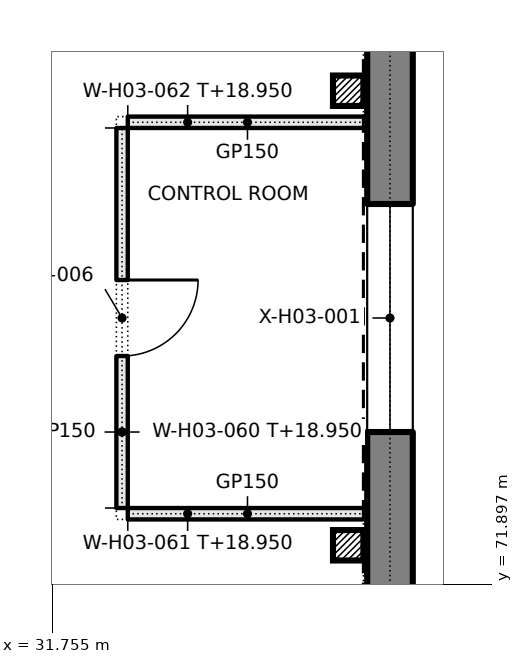
"""IFC4 building model, lengths in metres.
Left out: names, types, materials, properties, quantities, classifications, styles, units other than length and angle.
Written with IfcOpenShell. Run it as: python <this file> out.ifc"""

import sys

from ifc_helpers import new_model, si_unit, direction, frame, frame_2d, origin, origin_2d, place, context, subcontext, project, spatial, rectangle, extrude, element, fill, save


model = new_model("IFC4")
c1 = context("Model", 3, precision=1e-05, world=origin(), true_north=direction((0.0, 1.0)))
c2 = subcontext(c1, "Body", "Model", "MODEL_VIEW")
j1 = project(units=[si_unit("LENGTHUNIT", "METRE"), si_unit("PLANEANGLEUNIT", "RADIAN")], contexts=[c1])
p1 = place(None, origin())
s1 = spatial("IfcSite", under=j1, at=p1, CompositionType="ELEMENT")
p2 = place(p1, origin())
s2 = spatial("IfcBuilding", under=s1, at=p2, CompositionType="ELEMENT")
p3 = place(p2, frame((0.0, 0.0, 15.0)))
s3 = spatial("IfcBuildingStorey", under=s2, at=p3, CompositionType="ELEMENT", Elevation=15.0)
p4 = place(p3, frame((36.2, 60.7, 0.0), z_axis=(0.0, 0.0, 1.0), x_axis=(0.0, 1.0, 0.0)))
e1 = element("IfcWall", 1, at=p4, inside=s3, PredefinedType="SOLIDWALL", context=c2, shape_type="SweptSolid", body=[
    extrude(rectangle(XDim=29.4, YDim=0.6, at=frame_2d((14.7, 0.0))), origin(), (0.0, 0.0, 1.0), 4.2),
])
p5 = place(p4, frame((13.2, 0.0, 1.0)))
e2 = element("IfcOpeningElement", 2, at=p5, cuts=e1, PredefinedType="OPENING", context=c2, shape_type="SweptSolid", body=[
    extrude(rectangle(XDim=3.0, YDim=1.2, at=frame_2d((1.5, 0.6))), frame((0.0, 0.31, 0.0), z_axis=(0.0, -1.0, 0.0), x_axis=(1.0, 0.0, 0.0)), (0.0, 0.0, 1.0), 0.62),
])
for number, where, z_axis, x_axis in (
    (3, (35.65, 72.41, 0.0), (0.0, 0.0, 1.0), (1.0, 0.0, 0.0)),
    (4, (35.65, 78.39, 0.0), (0.0, 0.0, 1.0), (1.0, 0.0, 0.0)),
):
    element("IfcColumn", number, at=place(p3, frame(where, z_axis=z_axis, x_axis=x_axis)), inside=s3, PredefinedType="COLUMN", context=c2, shape_type="SweptSolid", body=[
        extrude(rectangle(XDim=0.4, YDim=0.4, at=origin_2d()), origin(), (0.0, 0.0, 1.0), 4.2),
    ])
p6 = place(p3, frame((32.675, 72.9, 0.0), z_axis=(0.0, 0.0, 1.0), x_axis=(0.0, 1.0, 0.0)))
e5 = element("IfcWall", 5, at=p6, inside=s3, PredefinedType="PARTITIONING", context=c2, shape_type="SweptSolid", body=[
    extrude(rectangle(XDim=5.0, YDim=0.15, at=frame_2d((2.5, 0.0))), origin(), (0.0, 0.0, 1.0), 3.95),
])
p7 = place(p6, frame((2.0, 0.0, 0.0)))
e6 = element("IfcOpeningElement", 6, at=p7, cuts=e5, PredefinedType="OPENING", context=c2, shape_type="SweptSolid", body=[
    extrude(rectangle(XDim=1.0, YDim=2.1, at=frame_2d((0.5, 1.05))), frame((0.0, 0.085, 0.0), z_axis=(0.0, -1.0, 0.0), x_axis=(1.0, 0.0, 0.0)), (0.0, 0.0, 1.0), 0.17),
])
for number, where, z_axis, x_axis in (
    (7, (32.75, 72.825, 0.0), (0.0, 0.0, 1.0), (1.0, 0.0, 0.0)),
    (8, (32.75, 77.975, 0.0), (0.0, 0.0, 1.0), (1.0, 0.0, 0.0)),
):
    element("IfcWall", number, at=place(p3, frame(where, z_axis=z_axis, x_axis=x_axis)), inside=s3, PredefinedType="PARTITIONING", context=c2, shape_type="SweptSolid", body=[
        extrude(rectangle(XDim=3.15, YDim=0.15, at=frame_2d((1.575, 0.0))), origin(), (0.0, 0.0, 1.0), 3.95),
    ])
p8 = place(p7, frame((1.0, 0.0, 0.0), z_axis=(0.0, 0.0, 1.0), x_axis=(-1.0, 0.0, 0.0)))
e9 = element("IfcDoor", 9, at=p8, inside=s3, OperationType="SINGLE_SWING_LEFT", PredefinedType="DOOR", context=c2, shape_type="SweptSolid", body=[
    extrude(rectangle(XDim=1.0, YDim=2.1, at=frame_2d((0.5, 1.05))), frame((0.0, 0.025, 0.0), z_axis=(0.0, -1.0, 0.0), x_axis=(1.0, 0.0, 0.0)), (0.0, 0.0, 1.0), 0.05),
])
fill(e6, e9)
p9 = place(p5, origin())
e10 = element("IfcWindow", 10, at=p9, inside=s3, PartitioningType="SINGLE_PANEL", PredefinedType="WINDOW", context=c2, shape_type="SweptSolid", body=[
    extrude(rectangle(XDim=3.0, YDim=1.2, at=frame_2d((1.5, 0.6))), frame((0.0, 0.03, 0.0), z_axis=(0.0, -1.0, 0.0), x_axis=(1.0, 0.0, 0.0)), (0.0, 0.0, 1.0), 0.06),
])
fill(e2, e10)
save(model, sys.argv[1])
